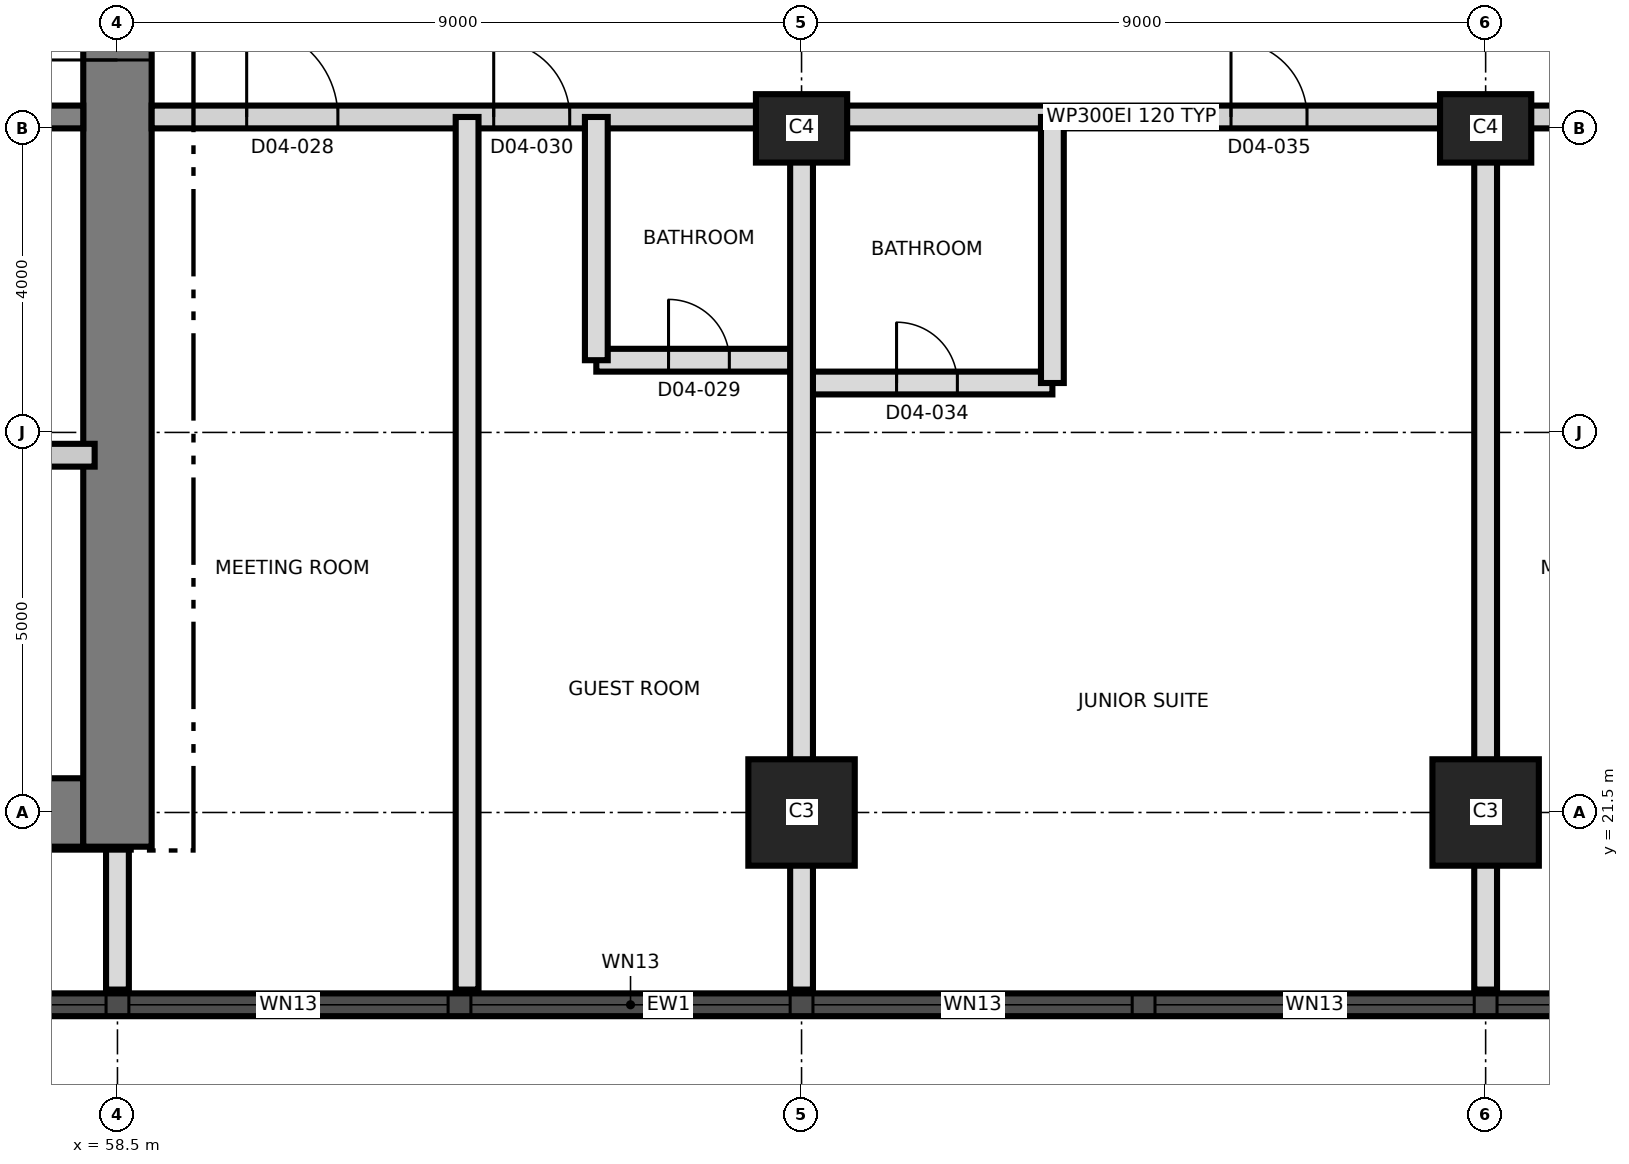
"""IFC4 building model, lengths in metres.
Left out: names, types, materials, properties, quantities, classifications, styles, units other than length and angle.
Written with IfcOpenShell. Run it as: python <this file> out.ifc"""

import sys

from ifc_helpers import new_model, si_unit, direction, frame, frame_2d, origin, origin_2d, place, context, subcontext, project, spatial, rectangle, extrude, element, fill, save


model = new_model("IFC4")
c1 = context("Model", 3, precision=1e-05, world=origin(), true_north=direction((0.0, 1.0)))
c2 = subcontext(c1, "Body", "Model", "MODEL_VIEW")
j1 = project(units=[si_unit("LENGTHUNIT", "METRE"), si_unit("PLANEANGLEUNIT", "RADIAN")], contexts=[c1])
p1 = place(None, origin())
s1 = spatial("IfcSite", under=j1, at=p1, CompositionType="ELEMENT")
p2 = place(p1, origin())
s2 = spatial("IfcBuilding", under=s1, at=p2, CompositionType="ELEMENT")
p3 = place(p2, frame((0.0, 0.0, 66.8)))
s3 = spatial("IfcBuildingStorey", under=s2, at=p3, CompositionType="ELEMENT", Elevation=66.8)
p4 = place(p3, frame((31.05, 21.5, 0.0), z_axis=(0.0, 0.0, 1.0), x_axis=(1.0, 0.0, 0.0)))
e1 = element("IfcWall", 1, at=p4, inside=s3, PredefinedType="SHEAR", context=c2, shape_type="SweptSolid", body=[
    extrude(rectangle(XDim=27.0, YDim=0.9, at=frame_2d((13.5, 0.0))), origin(), (0.0, 0.0, 1.0), 3.7),
])
p5 = place(p3, frame((58.5, 21.05, 0.0), z_axis=(0.0, 0.0, 1.0), x_axis=(0.0, 1.0, 0.0)))
e2 = element("IfcWall", 2, at=p5, inside=s3, PredefinedType="SHEAR", context=c2, shape_type="SweptSolid", body=[
    extrude(rectangle(XDim=18.9, YDim=0.9, at=frame_2d((9.45, 0.0))), origin(), (0.0, 0.0, 1.0), 3.7),
])
p6 = place(p5, frame((10.35, 0.0, 0.0)))
e3 = element("IfcOpeningElement", 3, at=p6, cuts=e2, PredefinedType="OPENING", context=c2, shape_type="SweptSolid", body=[
    extrude(rectangle(XDim=1.2, YDim=2.1, at=frame_2d((0.6, 1.05))), frame((0.0, 0.46, 0.0), z_axis=(0.0, -1.0, 0.0), x_axis=(1.0, 0.0, 0.0)), (0.0, 0.0, 1.0), 0.92),
])
p7 = place(p3, frame((31.95, 30.65, 0.0), z_axis=(0.0, 0.0, 1.0), x_axis=(1.0, 0.0, 0.0)))
e4 = element("IfcWall", 4, at=p7, inside=s3, PredefinedType="SHEAR", context=c2, shape_type="SweptSolid", body=[
    extrude(rectangle(XDim=26.1, YDim=0.3, at=frame_2d((13.05, 0.0))), origin(), (0.0, 0.0, 1.0), 3.7),
])
p8 = place(p7, frame((24.55, 0.0, 0.0)))
e5 = element("IfcOpeningElement", 5, at=p8, cuts=e4, PredefinedType="OPENING", context=c2, shape_type="SweptSolid", body=[
    extrude(rectangle(XDim=1.0, YDim=2.1, at=frame_2d((0.5, 1.05))), frame((0.0, 0.16, 0.0), z_axis=(0.0, -1.0, 0.0), x_axis=(1.0, 0.0, 0.0)), (0.0, 0.0, 1.0), 0.32),
])
p9 = place(p7, frame((11.35, 0.0, 0.0)))
e6 = element("IfcOpeningElement", 6, at=p9, cuts=e4, PredefinedType="OPENING", context=c2, shape_type="SweptSolid", body=[
    extrude(rectangle(XDim=1.0, YDim=2.1, at=frame_2d((0.5, 1.05))), frame((0.0, 0.16, 0.0), z_axis=(0.0, -1.0, 0.0), x_axis=(1.0, 0.0, 0.0)), (0.0, 0.0, 1.0), 0.32),
])
for number, where, z_axis, x_axis in (
    (7, (67.5, 21.5, 0.0), (0.0, 0.0, 1.0), (1.0, 0.0, 0.0)),
    (8, (76.5, 21.5, 0.0), (0.0, 0.0, 1.0), (1.0, 0.0, 0.0)),
):
    element("IfcColumn", number, at=place(p3, frame(where, z_axis=z_axis, x_axis=x_axis)), inside=s3, PredefinedType="COLUMN", context=c2, shape_type="SweptSolid", body=[
        extrude(rectangle(XDim=1.4, YDim=1.4, at=origin_2d()), origin(), (0.0, 0.0, 1.0), 3.7),
    ])
for number, where, z_axis, x_axis in (
    (9, (67.5, 30.5, 0.0), (0.0, 0.0, 1.0), (1.0, 0.0, 0.0)),
    (10, (76.5, 30.5, 0.0), (0.0, 0.0, 1.0), (1.0, 0.0, 0.0)),
):
    element("IfcColumn", number, at=place(p3, frame(where, z_axis=z_axis, x_axis=x_axis)), inside=s3, PredefinedType="COLUMN", context=c2, shape_type="SweptSolid", body=[
        extrude(rectangle(XDim=1.2, YDim=0.9, at=origin_2d()), origin(), (0.0, 0.0, 1.0), 3.7),
    ])
p10 = place(p3, frame((44.01, 18.97, 0.0), z_axis=(0.0, 0.0, 1.0), x_axis=(1.0, 0.0, 0.0)))
e11 = element("IfcWall", 11, at=p10, inside=s3, PredefinedType="SOLIDWALL", context=c2, shape_type="SweptSolid", body=[
    extrude(rectangle(XDim=43.478, YDim=0.3, at=frame_2d((21.739, 0.0))), origin(), (0.0, 0.0, 1.0), 3.4),
])
p11 = place(p10, frame((1.845, 0.0, 0.3)))
e12 = element("IfcOpeningElement", 12, at=p11, cuts=e11, PredefinedType="OPENING", context=c2, shape_type="SweptSolid", body=[
    extrude(rectangle(XDim=1.8, YDim=2.4, at=frame_2d((0.9, 1.2))), frame((0.0, 0.16, 0.0), z_axis=(0.0, -1.0, 0.0), x_axis=(1.0, 0.0, 0.0)), (0.0, 0.0, 1.0), 0.32),
])
p12 = place(p10, frame((5.64, 0.0, 0.9)))
e13 = element("IfcOpeningElement", 13, at=p12, cuts=e11, PredefinedType="OPENING", context=c2, shape_type="SweptSolid", body=[
    extrude(rectangle(XDim=4.2, YDim=1.7, at=frame_2d((2.1, 0.85))), frame((0.0, 0.16, 0.0), z_axis=(0.0, -1.0, 0.0), x_axis=(1.0, 0.0, 0.0)), (0.0, 0.0, 1.0), 0.32),
])
p13 = place(p10, frame((10.14, 0.0, 0.9)))
e14 = element("IfcOpeningElement", 14, at=p13, cuts=e11, PredefinedType="OPENING", context=c2, shape_type="SweptSolid", body=[
    extrude(rectangle(XDim=4.2, YDim=1.7, at=frame_2d((2.1, 0.85))), frame((0.0, 0.16, 0.0), z_axis=(0.0, -1.0, 0.0), x_axis=(1.0, 0.0, 0.0)), (0.0, 0.0, 1.0), 0.32),
])
p14 = place(p10, frame((14.64, 0.0, 0.9)))
e15 = element("IfcOpeningElement", 15, at=p14, cuts=e11, PredefinedType="OPENING", context=c2, shape_type="SweptSolid", body=[
    extrude(rectangle(XDim=4.2, YDim=1.7, at=frame_2d((2.1, 0.85))), frame((0.0, 0.16, 0.0), z_axis=(0.0, -1.0, 0.0), x_axis=(1.0, 0.0, 0.0)), (0.0, 0.0, 1.0), 0.32),
])
p15 = place(p10, frame((19.14, 0.0, 0.9)))
e16 = element("IfcOpeningElement", 16, at=p15, cuts=e11, PredefinedType="OPENING", context=c2, shape_type="SweptSolid", body=[
    extrude(rectangle(XDim=4.2, YDim=1.7, at=frame_2d((2.1, 0.85))), frame((0.0, 0.16, 0.0), z_axis=(0.0, -1.0, 0.0), x_axis=(1.0, 0.0, 0.0)), (0.0, 0.0, 1.0), 0.32),
])
p16 = place(p10, frame((23.64, 0.0, 0.9)))
e17 = element("IfcOpeningElement", 17, at=p16, cuts=e11, PredefinedType="OPENING", context=c2, shape_type="SweptSolid", body=[
    extrude(rectangle(XDim=4.2, YDim=1.7, at=frame_2d((2.1, 0.85))), frame((0.0, 0.16, 0.0), z_axis=(0.0, -1.0, 0.0), x_axis=(1.0, 0.0, 0.0)), (0.0, 0.0, 1.0), 0.32),
])
p17 = place(p10, frame((28.14, 0.0, 0.9)))
e18 = element("IfcOpeningElement", 18, at=p17, cuts=e11, PredefinedType="OPENING", context=c2, shape_type="SweptSolid", body=[
    extrude(rectangle(XDim=4.2, YDim=1.7, at=frame_2d((2.1, 0.85))), frame((0.0, 0.16, 0.0), z_axis=(0.0, -1.0, 0.0), x_axis=(1.0, 0.0, 0.0)), (0.0, 0.0, 1.0), 0.32),
])
p18 = place(p10, frame((32.64, 0.0, 0.9)))
e19 = element("IfcOpeningElement", 19, at=p18, cuts=e11, PredefinedType="OPENING", context=c2, shape_type="SweptSolid", body=[
    extrude(rectangle(XDim=4.2, YDim=1.7, at=frame_2d((2.1, 0.85))), frame((0.0, 0.16, 0.0), z_axis=(0.0, -1.0, 0.0), x_axis=(1.0, 0.0, 0.0)), (0.0, 0.0, 1.0), 0.32),
])
p19 = place(p10, frame((37.14, 0.0, 0.9)))
e20 = element("IfcOpeningElement", 20, at=p19, cuts=e11, PredefinedType="OPENING", context=c2, shape_type="SweptSolid", body=[
    extrude(rectangle(XDim=4.2, YDim=1.7, at=frame_2d((2.1, 0.85))), frame((0.0, 0.16, 0.0), z_axis=(0.0, -1.0, 0.0), x_axis=(1.0, 0.0, 0.0)), (0.0, 0.0, 1.0), 0.32),
])
p20 = place(p3, frame((55.8, 26.2, 0.0), z_axis=(0.0, 0.0, 1.0), x_axis=(1.0, 0.0, 0.0)))
e21 = element("IfcWall", 21, at=p20, inside=s3, PredefinedType="PARTITIONING", context=c2, shape_type="SweptSolid", body=[
    extrude(rectangle(XDim=2.4, YDim=0.3, at=frame_2d((1.2, 0.0))), origin(), (0.0, 0.0, 1.0), 3.4),
])
p21 = place(p20, frame((0.75, 0.0, 0.0)))
e22 = element("IfcOpeningElement", 22, at=p21, cuts=e21, PredefinedType="OPENING", context=c2, shape_type="SweptSolid", body=[
    extrude(rectangle(XDim=0.9, YDim=2.1, at=frame_2d((0.45, 1.05))), frame((0.0, 0.16, 0.0), z_axis=(0.0, -1.0, 0.0), x_axis=(1.0, 0.0, 0.0)), (0.0, 0.0, 1.0), 0.32),
])
p22 = place(p3, frame((67.5, 27.15, 0.0), z_axis=(0.0, 0.0, 1.0), x_axis=(1.0, 0.0, 0.0)))
e23 = element("IfcWall", 23, at=p22, inside=s3, PredefinedType="PARTITIONING", context=c2, shape_type="SweptSolid", body=[
    extrude(rectangle(XDim=3.3, YDim=0.3, at=frame_2d((1.65, 0.0))), origin(), (0.0, 0.0, 1.0), 3.4),
])
p23 = place(p22, frame((1.25, 0.0, 0.0)))
e24 = element("IfcOpeningElement", 24, at=p23, cuts=e23, PredefinedType="OPENING", context=c2, shape_type="SweptSolid", body=[
    extrude(rectangle(XDim=0.8, YDim=2.1, at=frame_2d((0.4, 1.05))), frame((0.0, 0.16, 0.0), z_axis=(0.0, -1.0, 0.0), x_axis=(1.0, 0.0, 0.0)), (0.0, 0.0, 1.0), 0.32),
])
p24 = place(p3, frame((64.8, 27.45, 0.0), z_axis=(0.0, 0.0, 1.0), x_axis=(1.0, 0.0, 0.0)))
e25 = element("IfcWall", 25, at=p24, inside=s3, PredefinedType="PARTITIONING", context=c2, shape_type="SweptSolid", body=[
    extrude(rectangle(XDim=2.7, YDim=0.3, at=frame_2d((1.35, 0.0))), origin(), (0.0, 0.0, 1.0), 3.4),
])
p25 = place(p24, frame((0.95, 0.0, 0.0)))
e26 = element("IfcOpeningElement", 26, at=p25, cuts=e25, PredefinedType="OPENING", context=c2, shape_type="SweptSolid", body=[
    extrude(rectangle(XDim=0.8, YDim=2.1, at=frame_2d((0.4, 1.05))), frame((0.0, 0.16, 0.0), z_axis=(0.0, -1.0, 0.0), x_axis=(1.0, 0.0, 0.0)), (0.0, 0.0, 1.0), 0.32),
])
p26 = place(p3, frame((58.95, 30.65, 0.0), z_axis=(0.0, 0.0, 1.0), x_axis=(1.0, 0.0, 0.0)))
e27 = element("IfcWall", 27, at=p26, inside=s3, PredefinedType="PARTITIONING", context=c2, shape_type="SweptSolid", body=[
    extrude(rectangle(XDim=26.38, YDim=0.3, at=frame_2d((13.19, 0.0))), origin(), (0.0, 0.0, 1.0), 3.4),
])
p27 = place(p26, frame((1.25, 0.0, 0.0)))
e28 = element("IfcOpeningElement", 28, at=p27, cuts=e27, PredefinedType="OPENING", context=c2, shape_type="SweptSolid", body=[
    extrude(rectangle(XDim=1.2, YDim=2.1, at=frame_2d((0.6, 1.05))), frame((0.0, 0.16, 0.0), z_axis=(0.0, -1.0, 0.0), x_axis=(1.0, 0.0, 0.0)), (0.0, 0.0, 1.0), 0.32),
])
p28 = place(p26, frame((4.5, 0.0, 0.0)))
e29 = element("IfcOpeningElement", 29, at=p28, cuts=e27, PredefinedType="OPENING", context=c2, shape_type="SweptSolid", body=[
    extrude(rectangle(XDim=1.0, YDim=2.1, at=frame_2d((0.5, 1.05))), frame((0.0, 0.16, 0.0), z_axis=(0.0, -1.0, 0.0), x_axis=(1.0, 0.0, 0.0)), (0.0, 0.0, 1.0), 0.32),
])
p29 = place(p26, frame((14.2, 0.0, 0.0)))
e30 = element("IfcOpeningElement", 30, at=p29, cuts=e27, PredefinedType="OPENING", context=c2, shape_type="SweptSolid", body=[
    extrude(rectangle(XDim=1.0, YDim=2.4, at=frame_2d((0.5, 1.2))), frame((0.0, 0.16, 0.0), z_axis=(0.0, -1.0, 0.0), x_axis=(1.0, 0.0, 0.0)), (0.0, 0.0, 1.0), 0.32),
])
p30 = place(p26, frame((18.685, 0.0, 0.0)))
e31 = element("IfcOpeningElement", 31, at=p30, cuts=e27, PredefinedType="OPENING", context=c2, shape_type="SweptSolid", body=[
    extrude(rectangle(XDim=1.2, YDim=2.1, at=frame_2d((0.6, 1.05))), frame((0.0, 0.16, 0.0), z_axis=(0.0, -1.0, 0.0), x_axis=(1.0, 0.0, 0.0)), (0.0, 0.0, 1.0), 0.32),
])
p31 = place(p26, frame((21.935, 0.0, 0.0)))
e32 = element("IfcOpeningElement", 32, at=p31, cuts=e27, PredefinedType="OPENING", context=c2, shape_type="SweptSolid", body=[
    extrude(rectangle(XDim=1.0, YDim=2.1, at=frame_2d((0.5, 1.05))), frame((0.0, 0.16, 0.0), z_axis=(0.0, -1.0, 0.0), x_axis=(1.0, 0.0, 0.0)), (0.0, 0.0, 1.0), 0.32),
])
p32 = place(p3, frame((58.5, 19.17, 0.0), z_axis=(0.0, 0.0, 1.0), x_axis=(0.0, 1.0, 0.0)))
e33 = element("IfcWall", 33, at=p32, inside=s3, PredefinedType="PARTITIONING", context=c2, shape_type="SweptSolid", body=[
    extrude(rectangle(XDim=1.86, YDim=0.3, at=frame_2d((0.93, 0.0))), origin(), (0.0, 0.0, 1.0), 3.35),
])
p33 = place(p3, frame((63.1, 19.17, 0.0), z_axis=(0.0, 0.0, 1.0), x_axis=(0.0, 1.0, 0.0)))
e34 = element("IfcWall", 34, at=p33, inside=s3, PredefinedType="PARTITIONING", context=c2, shape_type="SweptSolid", body=[
    extrude(rectangle(XDim=11.48, YDim=0.3, at=frame_2d((5.74, 0.0))), origin(), (0.0, 0.0, 1.0), 3.35),
])
p34 = place(p3, frame((64.8, 27.45, 0.0), z_axis=(0.0, 0.0, 1.0), x_axis=(0.0, 1.0, 0.0)))
e35 = element("IfcWall", 35, at=p34, inside=s3, PredefinedType="PARTITIONING", context=c2, shape_type="SweptSolid", body=[
    extrude(rectangle(XDim=3.2, YDim=0.3, at=frame_2d((1.6, 0.0))), origin(), (0.0, 0.0, 1.0), 3.4),
])
p35 = place(p3, frame((67.5, 19.17, 0.0), z_axis=(0.0, 0.0, 1.0), x_axis=(0.0, 1.0, 0.0)))
e36 = element("IfcWall", 36, at=p35, inside=s3, PredefinedType="PARTITIONING", context=c2, shape_type="SweptSolid", body=[
    extrude(rectangle(XDim=11.48, YDim=0.3, at=frame_2d((5.74, 0.0))), origin(), (0.0, 0.0, 1.0), 3.35),
])
p36 = place(p3, frame((70.8, 27.15, 0.0), z_axis=(0.0, 0.0, 1.0), x_axis=(0.0, 1.0, 0.0)))
e37 = element("IfcWall", 37, at=p36, inside=s3, PredefinedType="PARTITIONING", context=c2, shape_type="SweptSolid", body=[
    extrude(rectangle(XDim=3.5, YDim=0.3, at=frame_2d((1.75, 0.0))), origin(), (0.0, 0.0, 1.0), 3.4),
])
p37 = place(p3, frame((76.5, 19.17, 0.0), z_axis=(0.0, 0.0, 1.0), x_axis=(0.0, 1.0, 0.0)))
e38 = element("IfcWall", 38, at=p37, inside=s3, PredefinedType="PARTITIONING", context=c2, shape_type="SweptSolid", body=[
    extrude(rectangle(XDim=11.48, YDim=0.3, at=frame_2d((5.74, 0.0))), origin(), (0.0, 0.0, 1.0), 3.35),
])
p38 = place(p13, origin())
e39 = element("IfcWindow", 39, at=p38, inside=s3, PartitioningType="SINGLE_PANEL", PredefinedType="WINDOW", context=c2, shape_type="SweptSolid", body=[
    extrude(rectangle(XDim=4.2, YDim=1.7, at=frame_2d((2.1, 0.85))), frame((0.0, 0.03, 0.0), z_axis=(0.0, -1.0, 0.0), x_axis=(1.0, 0.0, 0.0)), (0.0, 0.0, 1.0), 0.06),
])
fill(e14, e39)
p39 = place(p14, origin())
e40 = element("IfcWindow", 40, at=p39, inside=s3, PartitioningType="SINGLE_PANEL", PredefinedType="WINDOW", context=c2, shape_type="SweptSolid", body=[
    extrude(rectangle(XDim=4.2, YDim=1.7, at=frame_2d((2.1, 0.85))), frame((0.0, 0.03, 0.0), z_axis=(0.0, -1.0, 0.0), x_axis=(1.0, 0.0, 0.0)), (0.0, 0.0, 1.0), 0.06),
])
fill(e15, e40)
p40 = place(p15, origin())
e41 = element("IfcWindow", 41, at=p40, inside=s3, PartitioningType="SINGLE_PANEL", PredefinedType="WINDOW", context=c2, shape_type="SweptSolid", body=[
    extrude(rectangle(XDim=4.2, YDim=1.7, at=frame_2d((2.1, 0.85))), frame((0.0, 0.03, 0.0), z_axis=(0.0, -1.0, 0.0), x_axis=(1.0, 0.0, 0.0)), (0.0, 0.0, 1.0), 0.06),
])
fill(e16, e41)
p41 = place(p16, origin())
e42 = element("IfcWindow", 42, at=p41, inside=s3, PartitioningType="SINGLE_PANEL", PredefinedType="WINDOW", context=c2, shape_type="SweptSolid", body=[
    extrude(rectangle(XDim=4.2, YDim=1.7, at=frame_2d((2.1, 0.85))), frame((0.0, 0.03, 0.0), z_axis=(0.0, -1.0, 0.0), x_axis=(1.0, 0.0, 0.0)), (0.0, 0.0, 1.0), 0.06),
])
fill(e17, e42)
p42 = place(p17, origin())
e43 = element("IfcWindow", 43, at=p42, inside=s3, PartitioningType="SINGLE_PANEL", PredefinedType="WINDOW", context=c2, shape_type="SweptSolid", body=[
    extrude(rectangle(XDim=4.2, YDim=1.7, at=frame_2d((2.1, 0.85))), frame((0.0, 0.03, 0.0), z_axis=(0.0, -1.0, 0.0), x_axis=(1.0, 0.0, 0.0)), (0.0, 0.0, 1.0), 0.06),
])
fill(e18, e43)
p43 = place(p18, origin())
e44 = element("IfcWindow", 44, at=p43, inside=s3, PartitioningType="SINGLE_PANEL", PredefinedType="WINDOW", context=c2, shape_type="SweptSolid", body=[
    extrude(rectangle(XDim=4.2, YDim=1.7, at=frame_2d((2.1, 0.85))), frame((0.0, 0.03, 0.0), z_axis=(0.0, -1.0, 0.0), x_axis=(1.0, 0.0, 0.0)), (0.0, 0.0, 1.0), 0.06),
])
fill(e19, e44)
p44 = place(p6, origin())
e45 = element("IfcDoor", 45, at=p44, inside=s3, OperationType="SINGLE_SWING_LEFT", PredefinedType="DOOR", context=c2, shape_type="SweptSolid", body=[
    extrude(rectangle(XDim=1.2, YDim=2.1, at=frame_2d((0.6, 1.05))), frame((0.0, 0.025, 0.0), z_axis=(0.0, -1.0, 0.0), x_axis=(1.0, 0.0, 0.0)), (0.0, 0.0, 1.0), 0.05),
])
fill(e3, e45)
p45 = place(p27, origin())
e46 = element("IfcDoor", 46, at=p45, inside=s3, OperationType="SINGLE_SWING_RIGHT", PredefinedType="DOOR", context=c2, shape_type="SweptSolid", body=[
    extrude(rectangle(XDim=1.2, YDim=2.1, at=frame_2d((0.6, 1.05))), frame((0.0, 0.025, 0.0), z_axis=(0.0, -1.0, 0.0), x_axis=(1.0, 0.0, 0.0)), (0.0, 0.0, 1.0), 0.05),
])
fill(e28, e46)
p46 = place(p25, origin())
e47 = element("IfcDoor", 47, at=p46, inside=s3, OperationType="SINGLE_SWING_LEFT", PredefinedType="DOOR", context=c2, shape_type="SweptSolid", body=[
    extrude(rectangle(XDim=0.8, YDim=2.1, at=frame_2d((0.4, 1.05))), frame((0.0, 0.025, 0.0), z_axis=(0.0, -1.0, 0.0), x_axis=(1.0, 0.0, 0.0)), (0.0, 0.0, 1.0), 0.05),
])
fill(e26, e47)
p47 = place(p28, origin())
e48 = element("IfcDoor", 48, at=p47, inside=s3, OperationType="SINGLE_SWING_LEFT", PredefinedType="DOOR", context=c2, shape_type="SweptSolid", body=[
    extrude(rectangle(XDim=1.0, YDim=2.1, at=frame_2d((0.5, 1.05))), frame((0.0, 0.025, 0.0), z_axis=(0.0, -1.0, 0.0), x_axis=(1.0, 0.0, 0.0)), (0.0, 0.0, 1.0), 0.05),
])
fill(e29, e48)
p48 = place(p23, origin())
e49 = element("IfcDoor", 49, at=p48, inside=s3, OperationType="SINGLE_SWING_LEFT", PredefinedType="DOOR", context=c2, shape_type="SweptSolid", body=[
    extrude(rectangle(XDim=0.8, YDim=2.1, at=frame_2d((0.4, 1.05))), frame((0.0, 0.025, 0.0), z_axis=(0.0, -1.0, 0.0), x_axis=(1.0, 0.0, 0.0)), (0.0, 0.0, 1.0), 0.05),
])
fill(e24, e49)
p49 = place(p29, origin())
e50 = element("IfcDoor", 50, at=p49, inside=s3, OperationType="SINGLE_SWING_RIGHT", PredefinedType="DOOR", context=c2, shape_type="SweptSolid", body=[
    extrude(rectangle(XDim=1.0, YDim=2.4, at=frame_2d((0.5, 1.2))), frame((0.0, 0.025, 0.0), z_axis=(0.0, -1.0, 0.0), x_axis=(1.0, 0.0, 0.0)), (0.0, 0.0, 1.0), 0.05),
])
fill(e30, e50)
save(model, sys.argv[1])
